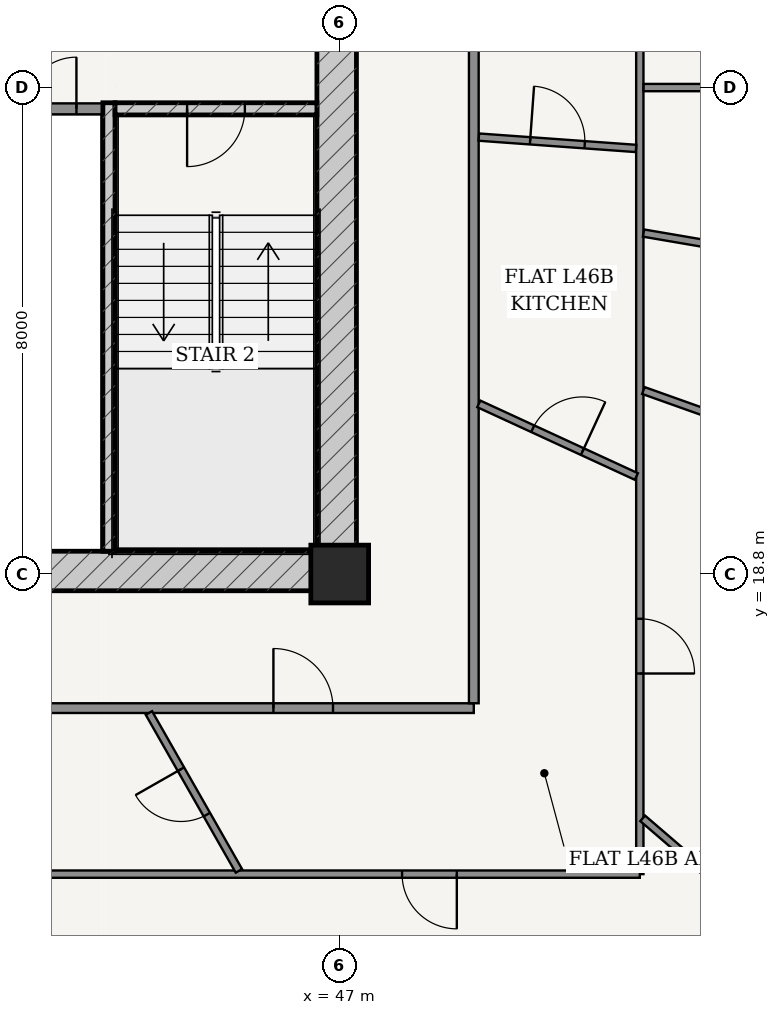
"""IFC4 building model, lengths in metres.
Left out: names, types, materials, properties, quantities, classifications, styles, units other than length and angle.
Written with IfcOpenShell. Run it as: python <this file> out.ifc"""

import sys

from ifc_helpers import new_model, si_unit, direction, frame, frame_2d, origin, origin_2d, place, context, subcontext, project, spatial, rectangle, extrude, source, transform, mapped, element, fill, save


model = new_model("IFC4")
c1 = context("Model", 3, precision=1e-05, world=origin(), true_north=direction((-0.2419218956, 0.970295726276)))
c2 = subcontext(c1, "Body", "Model", "MODEL_VIEW")
j1 = project(units=[si_unit("LENGTHUNIT", "METRE"), si_unit("PLANEANGLEUNIT", "RADIAN")], contexts=[c1])
p1 = place(None, origin())
s1 = spatial("IfcSite", under=j1, at=p1, CompositionType="ELEMENT")
p2 = place(p1, origin())
s2 = spatial("IfcBuilding", under=s1, at=p2, CompositionType="ELEMENT")
p3 = place(p2, frame((0.0, 0.0, 175.0)))
s3 = spatial("IfcBuildingStorey", under=s2, at=p3, CompositionType="ELEMENT", Elevation=175.0)
p4 = place(p3, frame((47.0, 18.8, 0.0), z_axis=(0.0, 0.0, 1.0), x_axis=(1.0, 0.0, 0.0)))
e1 = element("IfcColumn", 1, at=p4, inside=s3, PredefinedType="COLUMN", context=c2, shape_type="SweptSolid", body=[
    extrude(rectangle(XDim=0.95, YDim=0.95, at=origin_2d()), origin(), (0.0, 0.0, 1.0), 3.6),
])
p5 = place(p3, frame((28.725, 18.85, 0.0), z_axis=(0.0, 0.0, 1.0), x_axis=(1.0, 0.0, 0.0)))
e2 = element("IfcWall", 2, at=p5, inside=s3, PredefinedType="SHEAR", context=c2, shape_type="SweptSolid", body=[
    extrude(rectangle(XDim=18.55, YDim=0.65, at=frame_2d((9.275, 0.0))), origin(), (0.0, 0.0, 1.0), 3.33),
])
p6 = place(p5, frame((6.81, 0.0, 0.0)))
e3 = element("IfcOpeningElement", 3, at=p6, cuts=e2, PredefinedType="OPENING", context=c2, shape_type="SweptSolid", body=[
    extrude(rectangle(XDim=0.85, YDim=2.1, at=frame_2d((0.425, 1.05))), frame((0.0, 0.335, 0.0), z_axis=(0.0, -1.0, 0.0), x_axis=(1.0, 0.0, 0.0)), (0.0, 0.0, 1.0), 0.67),
])
p7 = place(p5, frame((8.85, 0.0, 0.0)))
e4 = element("IfcOpeningElement", 4, at=p7, cuts=e2, PredefinedType="OPENING", context=c2, shape_type="SweptSolid", body=[
    extrude(rectangle(XDim=0.85, YDim=2.1, at=frame_2d((0.425, 1.05))), frame((0.0, 0.335, 0.0), z_axis=(0.0, -1.0, 0.0), x_axis=(1.0, 0.0, 0.0)), (0.0, 0.0, 1.0), 0.67),
])
p8 = place(p5, frame((10.89, 0.0, 0.0)))
e5 = element("IfcOpeningElement", 5, at=p8, cuts=e2, PredefinedType="OPENING", context=c2, shape_type="SweptSolid", body=[
    extrude(rectangle(XDim=0.85, YDim=2.1, at=frame_2d((0.425, 1.05))), frame((0.0, 0.335, 0.0), z_axis=(0.0, -1.0, 0.0), x_axis=(1.0, 0.0, 0.0)), (0.0, 0.0, 1.0), 0.67),
])
p9 = place(p3, frame((46.95, 19.175, 0.0), z_axis=(0.0, 0.0, 1.0), x_axis=(0.0, 1.0, 0.0)))
e6 = element("IfcWall", 6, at=p9, inside=s3, PredefinedType="SHEAR", context=c2, shape_type="SweptSolid", body=[
    extrude(rectangle(XDim=15.25, YDim=0.65, at=frame_2d((7.625, 0.0))), origin(), (0.0, 0.0, 1.0), 3.33),
])
p10 = place(p9, frame((9.875, 0.0, 0.0)))
e7 = element("IfcOpeningElement", 7, at=p10, cuts=e6, PredefinedType="OPENING", context=c2, shape_type="SweptSolid", body=[
    extrude(rectangle(XDim=1.5, YDim=2.2, at=frame_2d((0.75, 1.1))), frame((0.0, 0.335, 0.0), z_axis=(0.0, -1.0, 0.0), x_axis=(1.0, 0.0, 0.0)), (0.0, 0.0, 1.0), 0.67),
])
p11 = place(p3, frame((43.205, 19.175, 0.0), z_axis=(0.0, 0.0, 1.0), x_axis=(0.0, 1.0, 0.0)))
e8 = element("IfcWall", 8, at=p11, inside=s3, PredefinedType="SOLIDWALL", context=c2, shape_type="SweptSolid", body=[
    extrude(rectangle(XDim=7.375, YDim=0.2, at=frame_2d((3.688, 0.0))), origin(), (0.0, 0.0, 1.0), 3.33),
])
p12 = place(p3, frame((43.305, 26.45, 0.0), z_axis=(0.0, 0.0, 1.0), x_axis=(1.0, 0.0, 0.0)))
e9 = element("IfcWall", 9, at=p12, inside=s3, PredefinedType="SOLIDWALL", context=c2, shape_type="SweptSolid", body=[
    extrude(rectangle(XDim=3.32, YDim=0.2, at=frame_2d((1.66, 0.0))), origin(), (0.0, 0.0, 1.0), 3.33),
])
p13 = place(p12, frame((1.185, 0.0, 0.0)))
e10 = element("IfcOpeningElement", 10, at=p13, cuts=e9, PredefinedType="OPENING", context=c2, shape_type="SweptSolid", body=[
    extrude(rectangle(XDim=0.95, YDim=2.15, at=frame_2d((0.475, 1.075))), frame((0.0, 0.11, 0.0), z_axis=(0.0, -1.0, 0.0), x_axis=(1.0, 0.0, 0.0)), (0.0, 0.0, 1.0), 0.22),
])
p14 = place(p3, frame((51.367, 9.478, 0.0), z_axis=(0.0, 0.0, 1.0), x_axis=(0.75843401647, 0.651749831348, 0.0)))
e11 = element("IfcWall", 11, at=p14, inside=s3, PredefinedType="SOLIDWALL", context=c2, shape_type="SweptSolid", body=[
    extrude(rectangle(XDim=8.952, YDim=0.28, at=frame_2d((4.476, 0.0))), origin(), (0.0, 0.0, 1.0), 3.33),
])
p15 = place(p14, frame((1.367, 0.0, 0.85)))
e12 = element("IfcOpeningElement", 12, at=p15, cuts=e11, PredefinedType="OPENING", context=c2, shape_type="SweptSolid", body=[
    extrude(rectangle(XDim=2.1, YDim=1.95, at=frame_2d((1.05, 0.975))), frame((0.0, 0.15, 0.0), z_axis=(0.0, -1.0, 0.0), x_axis=(1.0, 0.0, 0.0)), (0.0, 0.0, 1.0), 0.3),
])
p16 = place(p14, frame((5.485, 0.0, 0.85)))
e13 = element("IfcOpeningElement", 13, at=p16, cuts=e11, PredefinedType="OPENING", context=c2, shape_type="SweptSolid", body=[
    extrude(rectangle(XDim=2.1, YDim=1.95, at=frame_2d((1.05, 0.975))), frame((0.0, 0.15, 0.0), z_axis=(0.0, -1.0, 0.0), x_axis=(1.0, 0.0, 0.0)), (0.0, 0.0, 1.0), 0.3),
])
p17 = place(p3, frame((41.39, 26.45, 0.0), z_axis=(0.0, 0.0, 1.0), x_axis=(1.0, 0.0, 0.0)))
e14 = element("IfcWall", 14, at=p17, inside=s3, PredefinedType="PARTITIONING", context=c2, shape_type="SweptSolid", body=[
    extrude(rectangle(XDim=1.71, YDim=0.18, at=frame_2d((0.855, 0.0))), origin(), (0.0, 0.0, 1.0), 3.33),
])
p18 = place(p17, frame((0.43, 0.0, 0.0)))
e15 = element("IfcOpeningElement", 15, at=p18, cuts=e14, PredefinedType="OPENING", context=c2, shape_type="SweptSolid", body=[
    extrude(rectangle(XDim=0.85, YDim=2.1, at=frame_2d((0.425, 1.05))), frame((0.0, 0.1, 0.0), z_axis=(0.0, -1.0, 0.0), x_axis=(1.0, 0.0, 0.0)), (0.0, 0.0, 1.0), 0.2),
])
p19 = place(p3, frame((34.32, 16.595, 0.0), z_axis=(0.0, 0.0, 1.0), x_axis=(1.0, 0.0, 0.0)))
e16 = element("IfcWall", 16, at=p19, inside=s3, PredefinedType="PARTITIONING", context=c2, shape_type="SweptSolid", body=[
    extrude(rectangle(XDim=14.885, YDim=0.16, at=frame_2d((7.442, 0.0))), origin(), (0.0, 0.0, 1.0), 2.776),
])
p20 = place(p19, frame((11.59, 0.0, 0.0)))
e17 = element("IfcOpeningElement", 17, at=p20, cuts=e16, PredefinedType="OPENING", context=c2, shape_type="SweptSolid", body=[
    extrude(rectangle(XDim=0.98, YDim=2.2, at=frame_2d((0.49, 1.1))), frame((0.0, 0.09, 0.0), z_axis=(0.0, -1.0, 0.0), x_axis=(1.0, 0.0, 0.0)), (0.0, 0.0, 1.0), 0.18),
])
p21 = place(p3, frame((49.205, 16.675, 0.0), z_axis=(0.0, 0.0, 1.0), x_axis=(0.0, 1.0, 0.0)))
e18 = element("IfcWall", 18, at=p21, inside=s3, PredefinedType="PARTITIONING", context=c2, shape_type="SweptSolid", body=[
    extrude(rectangle(XDim=18.4, YDim=0.16, at=frame_2d((9.2, 0.0))), origin(), (0.0, 0.0, 1.0), 2.776),
])
p22 = place(p3, frame((51.935, 37.885, 0.0), z_axis=(0.0, 0.0, 1.0), x_axis=(0.0, -1.0, 0.0)))
e19 = element("IfcWall", 19, at=p22, inside=s3, PredefinedType="PARTITIONING", context=c2, shape_type="SweptSolid", body=[
    extrude(rectangle(XDim=24.02, YDim=0.12, at=frame_2d((12.01, 0.0))), origin(), (0.0, 0.0, 1.0), 2.776),
])
p23 = place(p22, frame((19.821, 0.0, 0.0)))
e20 = element("IfcOpeningElement", 20, at=p23, cuts=e19, PredefinedType="OPENING", context=c2, shape_type="SweptSolid", body=[
    extrude(rectangle(XDim=0.9, YDim=2.15, at=frame_2d((0.45, 1.075))), frame((0.0, 0.07, 0.0), z_axis=(0.0, -1.0, 0.0), x_axis=(1.0, 0.0, 0.0)), (0.0, 0.0, 1.0), 0.14),
])
p24 = place(p3, frame((51.935, 13.865, 0.0), z_axis=(0.0, 0.0, 1.0), x_axis=(-1.0, 0.0, 0.0)))
e21 = element("IfcWall", 21, at=p24, inside=s3, PredefinedType="PARTITIONING", context=c2, shape_type="SweptSolid", body=[
    extrude(rectangle(XDim=13.833, YDim=0.12, at=frame_2d((6.917, 0.0))), origin(), (0.0, 0.0, 1.0), 2.776),
])
p25 = place(p24, frame((3.009, 0.0, 0.0)))
e22 = element("IfcOpeningElement", 22, at=p25, cuts=e21, PredefinedType="OPENING", context=c2, shape_type="SweptSolid", body=[
    extrude(rectangle(XDim=0.9, YDim=2.15, at=frame_2d((0.45, 1.075))), frame((0.0, 0.07, 0.0), z_axis=(0.0, -1.0, 0.0), x_axis=(1.0, 0.0, 0.0)), (0.0, 0.0, 1.0), 0.14),
])
p26 = place(p3, frame((51.982, 14.782, 0.0), z_axis=(0.0, 0.0, 1.0), x_axis=(0.758356837469, -0.651839632935, 0.0)))
e23 = element("IfcWall", 23, at=p26, inside=s3, PredefinedType="PARTITIONING", context=c2, shape_type="SweptSolid", body=[
    extrude(rectangle(XDim=4.064, YDim=0.12, at=frame_2d((2.032, 0.0))), origin(), (0.0, 0.0, 1.0), 2.846),
])
p27 = place(p3, frame((51.993, 21.818, 0.0), z_axis=(0.0, 0.0, 1.0), x_axis=(0.942077868165, -0.335394231187, 0.0)))
e24 = element("IfcWall", 24, at=p27, inside=s3, PredefinedType="PARTITIONING", context=c2, shape_type="SweptSolid", body=[
    extrude(rectangle(XDim=8.817, YDim=0.12, at=frame_2d((4.408, 0.0))), origin(), (0.0, 0.0, 1.0), 2.846),
])
p28 = place(p27, frame((3.958, 0.0, 0.0)))
e25 = element("IfcOpeningElement", 25, at=p28, cuts=e24, PredefinedType="OPENING", context=c2, shape_type="SweptSolid", body=[
    extrude(rectangle(XDim=0.9, YDim=2.15, at=frame_2d((0.45, 1.075))), frame((0.0, 0.07, 0.0), z_axis=(0.0, -1.0, 0.0), x_axis=(1.0, 0.0, 0.0)), (0.0, 0.0, 1.0), 0.14),
])
p29 = place(p3, frame((51.996, 24.407, 0.0), z_axis=(0.0, 0.0, 1.0), x_axis=(0.985698378271, -0.168519159369, 0.0)))
e26 = element("IfcWall", 26, at=p29, inside=s3, PredefinedType="PARTITIONING", context=c2, shape_type="SweptSolid", body=[
    extrude(rectangle(XDim=9.769, YDim=0.12, at=frame_2d((4.884, 0.0))), origin(), (0.0, 0.0, 1.0), 2.776),
])
p30 = place(p29, frame((3.428, 0.0, 0.0)))
e27 = element("IfcOpeningElement", 27, at=p30, cuts=e26, PredefinedType="OPENING", context=c2, shape_type="SweptSolid", body=[
    extrude(rectangle(XDim=0.9, YDim=2.15, at=frame_2d((0.45, 1.075))), frame((0.0, 0.07, 0.0), z_axis=(0.0, -1.0, 0.0), x_axis=(1.0, 0.0, 0.0)), (0.0, 0.0, 1.0), 0.14),
])
p31 = place(p3, frame((51.997, 26.8, 0.0), z_axis=(0.0, 0.0, 1.0), x_axis=(1.0, 0.0, 0.0)))
e28 = element("IfcWall", 28, at=p31, inside=s3, PredefinedType="PARTITIONING", context=c2, shape_type="SweptSolid", body=[
    extrude(rectangle(XDim=10.143, YDim=0.12, at=frame_2d((5.071, 0.0))), origin(), (0.0, 0.0, 1.0), 2.846),
])
p32 = place(p31, frame((4.622, 0.0, 0.0)))
e29 = element("IfcOpeningElement", 29, at=p32, cuts=e28, PredefinedType="OPENING", context=c2, shape_type="SweptSolid", body=[
    extrude(rectangle(XDim=0.9, YDim=2.15, at=frame_2d((0.45, 1.075))), frame((0.0, 0.07, 0.0), z_axis=(0.0, -1.0, 0.0), x_axis=(1.0, 0.0, 0.0)), (0.0, 0.0, 1.0), 0.14),
])
p33 = place(p3, frame((43.862, 16.515, 0.0), z_axis=(0.0, 0.0, 1.0), x_axis=(0.495214761056, -0.868770591372, 0.0)))
e30 = element("IfcWall", 30, at=p33, inside=s3, PredefinedType="PARTITIONING", context=c2, shape_type="SweptSolid", body=[
    extrude(rectangle(XDim=2.988, YDim=0.12, at=frame_2d((1.494, 0.0))), origin(), (0.0, 0.0, 1.0), 3.005),
])
p34 = place(p33, frame((1.064, 0.0, 0.0)))
e31 = element("IfcOpeningElement", 31, at=p34, cuts=e30, PredefinedType="OPENING", context=c2, shape_type="SweptSolid", body=[
    extrude(rectangle(XDim=0.86, YDim=2.15, at=frame_2d((0.43, 1.075))), frame((0.0, 0.07, 0.0), z_axis=(0.0, -1.0, 0.0), x_axis=(1.0, 0.0, 0.0)), (0.0, 0.0, 1.0), 0.14),
])
p35 = place(p3, frame((49.287, 21.598, 0.0), z_axis=(0.0, 0.0, 1.0), x_axis=(0.908177096136, -0.418586146514, 0.0)))
e32 = element("IfcWall", 32, at=p35, inside=s3, PredefinedType="PARTITIONING", context=c2, shape_type="SweptSolid", body=[
    extrude(rectangle(XDim=2.854, YDim=0.12, at=frame_2d((1.427, 0.0))), origin(), (0.0, 0.0, 1.0), 3.33),
])
p36 = place(p35, frame((0.977, 0.0, 0.0)))
e33 = element("IfcOpeningElement", 33, at=p36, cuts=e32, PredefinedType="OPENING", context=c2, shape_type="SweptSolid", body=[
    extrude(rectangle(XDim=0.9, YDim=2.15, at=frame_2d((0.45, 1.075))), frame((0.0, 0.07, 0.0), z_axis=(0.0, -1.0, 0.0), x_axis=(1.0, 0.0, 0.0)), (0.0, 0.0, 1.0), 0.14),
])
p37 = place(p3, frame((49.287, 25.985, 0.0), z_axis=(0.0, 0.0, 1.0), x_axis=(0.997408744903, -0.07194300237, 0.0)))
e34 = element("IfcWall", 34, at=p37, inside=s3, PredefinedType="PARTITIONING", context=c2, shape_type="SweptSolid", body=[
    extrude(rectangle(XDim=2.593, YDim=0.12, at=frame_2d((1.296, 0.0))), origin(), (0.0, 0.0, 1.0), 3.33),
])
p38 = place(p37, frame((0.846, 0.0, 0.0)))
e35 = element("IfcOpeningElement", 35, at=p38, cuts=e34, PredefinedType="OPENING", context=c2, shape_type="SweptSolid", body=[
    extrude(rectangle(XDim=0.9, YDim=2.15, at=frame_2d((0.45, 1.075))), frame((0.0, 0.07, 0.0), z_axis=(0.0, -1.0, 0.0), x_axis=(1.0, 0.0, 0.0)), (0.0, 0.0, 1.0), 0.14),
])
m1 = source(origin(), c2, "Body", "SweptSolid", [
    extrude(rectangle(XDim=0.95, YDim=2.15, at=frame_2d((0.475, 1.075))), frame((0.0, 0.025, 0.0), z_axis=(0.0, -1.0, 0.0), x_axis=(1.0, 0.0, 0.0)), (0.0, 0.0, 1.0), 0.05),
])
p39 = place(p13, frame((0.95, 0.0, 0.0), z_axis=(0.0, 0.0, 1.0), x_axis=(-1.0, 0.0, 0.0)))
e36 = element("IfcDoor", 36, at=p39, inside=s3, OperationType="SINGLE_SWING_RIGHT", PredefinedType="DOOR", context=c2, shape_type="MappedRepresentation", body=[
    mapped(m1, transform((0.0, 0.0, 0.0), scale=1.0)),
])
fill(e10, e36)
m2 = source(origin(), c2, "Body", "SweptSolid", [
    extrude(rectangle(XDim=0.85, YDim=2.1, at=frame_2d((0.425, 1.05))), frame((0.0, 0.025, 0.0), z_axis=(0.0, -1.0, 0.0), x_axis=(1.0, 0.0, 0.0)), (0.0, 0.0, 1.0), 0.05),
])
p40 = place(p18, origin())
e37 = element("IfcDoor", 37, at=p40, inside=s3, OperationType="SINGLE_SWING_RIGHT", PredefinedType="DOOR", context=c2, shape_type="MappedRepresentation", body=[
    mapped(m2, transform((0.0, 0.0, 0.0), scale=1.0)),
])
fill(e15, e37)
m3 = source(origin(), c2, "Body", "SweptSolid", [
    extrude(rectangle(XDim=0.98, YDim=2.2, at=frame_2d((0.49, 1.1))), frame((0.0, 0.025, 0.0), z_axis=(0.0, -1.0, 0.0), x_axis=(1.0, 0.0, 0.0)), (0.0, 0.0, 1.0), 0.05),
])
p41 = place(p20, origin())
e38 = element("IfcDoor", 38, at=p41, inside=s3, OperationType="SINGLE_SWING_LEFT", PredefinedType="DOOR", context=c2, shape_type="MappedRepresentation", body=[
    mapped(m3, transform((0.0, 0.0, 0.0), scale=1.0)),
])
fill(e17, e38)
m4 = source(origin(), c2, "Body", "SweptSolid", [
    extrude(rectangle(XDim=0.86, YDim=2.15, at=frame_2d((0.43, 1.075))), frame((0.0, 0.025, 0.0), z_axis=(0.0, -1.0, 0.0), x_axis=(1.0, 0.0, 0.0)), (0.0, 0.0, 1.0), 0.05),
])
p42 = place(p34, frame((0.86, 0.0, 0.0), z_axis=(0.0, 0.0, 1.0), x_axis=(-1.0, 0.0, 0.0)))
e39 = element("IfcDoor", 39, at=p42, inside=s3, OperationType="SINGLE_SWING_RIGHT", PredefinedType="DOOR", context=c2, shape_type="MappedRepresentation", body=[
    mapped(m4, transform((0.0, 0.0, 0.0), scale=1.0)),
])
fill(e31, e39)
m5 = source(origin(), c2, "Body", "SweptSolid", [
    extrude(rectangle(XDim=0.9, YDim=2.15, at=frame_2d((0.45, 1.075))), frame((0.0, 0.025, 0.0), z_axis=(0.0, -1.0, 0.0), x_axis=(1.0, 0.0, 0.0)), (0.0, 0.0, 1.0), 0.05),
])
p43 = place(p25, origin())
e40 = element("IfcDoor", 40, at=p43, inside=s3, OperationType="SINGLE_SWING_LEFT", PredefinedType="DOOR", context=c2, shape_type="MappedRepresentation", body=[
    mapped(m5, transform((0.0, 0.0, 0.0), scale=1.0)),
])
fill(e22, e40)
p44 = place(p36, origin())
e41 = element("IfcDoor", 41, at=p44, inside=s3, OperationType="SINGLE_SWING_RIGHT", PredefinedType="DOOR", context=c2, shape_type="MappedRepresentation", body=[
    mapped(m5, transform((0.0, 0.0, 0.0), scale=1.0)),
])
fill(e33, e41)
p45 = place(p38, origin())
e42 = element("IfcDoor", 42, at=p45, inside=s3, OperationType="SINGLE_SWING_LEFT", PredefinedType="DOOR", context=c2, shape_type="MappedRepresentation", body=[
    mapped(m5, transform((0.0, 0.0, 0.0), scale=1.0)),
])
fill(e35, e42)
p46 = place(p23, origin())
e43 = element("IfcDoor", 43, at=p46, inside=s3, OperationType="SINGLE_SWING_RIGHT", PredefinedType="DOOR", context=c2, shape_type="MappedRepresentation", body=[
    mapped(m5, transform((0.0, 0.0, 0.0), scale=1.0)),
])
fill(e20, e43)
save(model, sys.argv[1])
